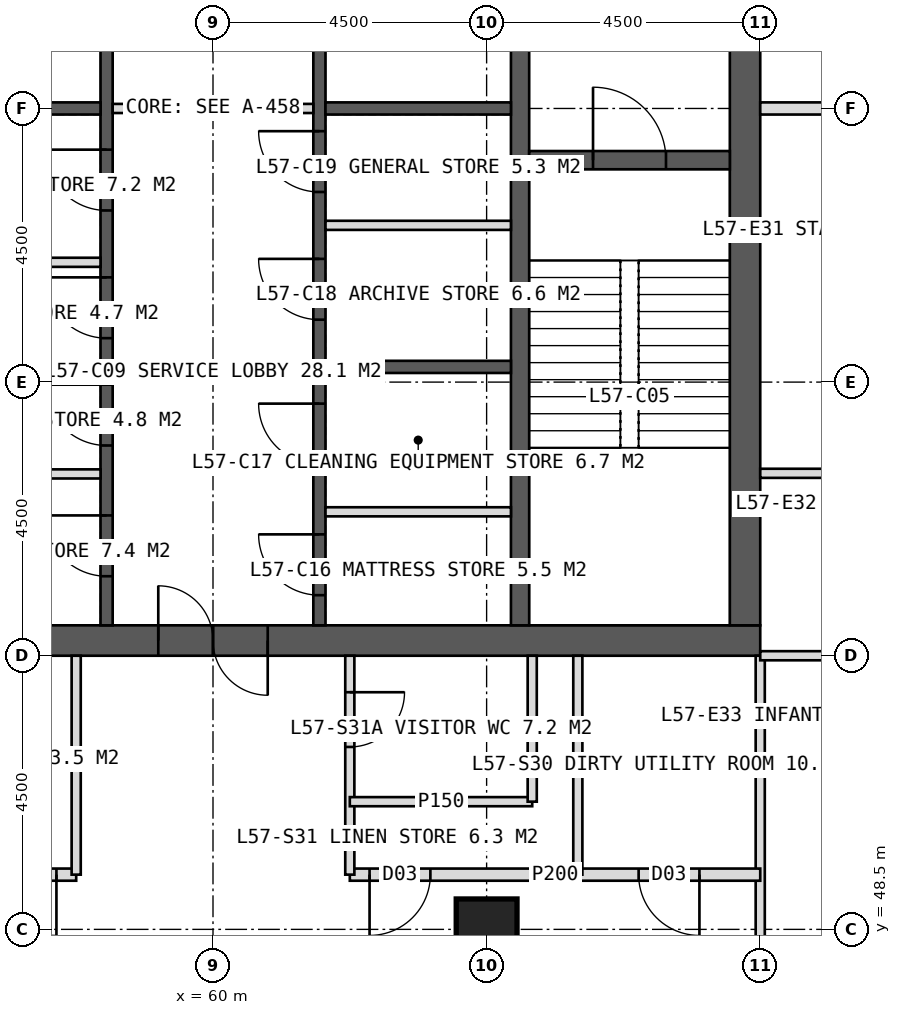
"""IFC4 building model, lengths in metres.
Left out: names, types, materials, properties, quantities, classifications, styles, units other than length and angle.
Written with IfcOpenShell. Run it as: python <this file> out.ifc"""

import sys

from ifc_helpers import new_model, si_unit, direction, frame, frame_2d, origin, origin_2d, place, context, subcontext, project, spatial, rectangle, hollow_rectangle, extrude, element, fill, save


model = new_model("IFC4")
c1 = context("Model", 3, precision=1e-05, world=origin(), true_north=direction((0.0, 1.0)))
c2 = subcontext(c1, "Body", "Model", "MODEL_VIEW")
j1 = project(units=[si_unit("LENGTHUNIT", "METRE"), si_unit("PLANEANGLEUNIT", "RADIAN")], contexts=[c1])
p1 = place(None, origin())
s1 = spatial("IfcSite", under=j1, at=p1, CompositionType="ELEMENT")
p2 = place(p1, origin())
s2 = spatial("IfcBuilding", under=s1, at=p2, CompositionType="ELEMENT")
p3 = place(p2, frame((0.0, 0.0, 237.0)))
s3 = spatial("IfcBuildingStorey", under=s2, at=p3, CompositionType="ELEMENT", Elevation=237.0)
p4 = place(p3, frame((51.0, 53.25, 0.0), z_axis=(0.0, 0.0, 1.0), x_axis=(1.0, 0.0, 0.0)))
e1 = element("IfcWall", 1, at=p4, inside=s3, PredefinedType="SHEAR", context=c2, shape_type="SweptSolid", body=[
    extrude(rectangle(XDim=18.0, YDim=0.5, at=frame_2d((9.0, 0.0))), origin(), (0.0, 0.0, 1.0), 4.0),
])
p5 = place(p4, frame((8.1, 0.0, 0.0)))
e2 = element("IfcOpeningElement", 2, at=p5, cuts=e1, PredefinedType="OPENING", context=c2, shape_type="SweptSolid", body=[
    extrude(rectangle(XDim=1.8, YDim=2.2, at=frame_2d((0.9, 1.1))), frame((0.0, 0.26, 0.0), z_axis=(0.0, -1.0, 0.0), x_axis=(1.0, 0.0, 0.0)), (0.0, 0.0, 1.0), 0.52),
])
p6 = place(p3, frame((68.75, 53.5, 0.0), z_axis=(0.0, 0.0, 1.0), x_axis=(0.0, 1.0, 0.0)))
e3 = element("IfcWall", 3, at=p6, inside=s3, PredefinedType="SHEAR", context=c2, shape_type="SweptSolid", body=[
    extrude(rectangle(XDim=17.0, YDim=0.5, at=frame_2d((8.5, 0.0))), origin(), (0.0, 0.0, 1.0), 4.0),
])
p7 = place(p6, frame((9.6, 0.0, 0.0)))
e4 = element("IfcOpeningElement", 4, at=p7, cuts=e3, PredefinedType="OPENING", context=c2, shape_type="SweptSolid", body=[
    extrude(rectangle(XDim=1.5, YDim=2.2, at=frame_2d((0.75, 1.1))), frame((0.0, 0.26, 0.0), z_axis=(0.0, -1.0, 0.0), x_axis=(1.0, 0.0, 0.0)), (0.0, 0.0, 1.0), 0.52),
])
p8 = place(p3, frame((65.05, 53.5, 0.0), z_axis=(0.0, 0.0, 1.0), x_axis=(0.0, 1.0, 0.0)))
e5 = element("IfcWall", 5, at=p8, inside=s3, PredefinedType="SHEAR", context=c2, shape_type="SweptSolid", body=[
    extrude(rectangle(XDim=17.0, YDim=0.3, at=frame_2d((8.5, 0.0))), origin(), (0.0, 0.0, 1.0), 4.0),
])
p9 = place(p3, frame((58.25, 53.5, 0.0), z_axis=(0.0, 0.0, 1.0), x_axis=(0.0, 1.0, 0.0)))
e6 = element("IfcWall", 6, at=p9, inside=s3, PredefinedType="SHEAR", context=c2, shape_type="SweptSolid", body=[
    extrude(rectangle(XDim=17.0, YDim=0.2, at=frame_2d((8.5, 0.0))), origin(), (0.0, 0.0, 1.0), 4.0),
])
p10 = place(p9, frame((0.808, 0.0, 0.0)))
e7 = element("IfcOpeningElement", 7, at=p10, cuts=e6, PredefinedType="OPENING", context=c2, shape_type="SweptSolid", body=[
    extrude(rectangle(XDim=1.0, YDim=2.1, at=frame_2d((0.5, 1.05))), frame((0.0, 0.11, 0.0), z_axis=(0.0, -1.0, 0.0), x_axis=(1.0, 0.0, 0.0)), (0.0, 0.0, 1.0), 0.22),
])
p11 = place(p9, frame((2.958, 0.0, 0.0)))
e8 = element("IfcOpeningElement", 8, at=p11, cuts=e6, PredefinedType="OPENING", context=c2, shape_type="SweptSolid", body=[
    extrude(rectangle(XDim=1.0, YDim=2.1, at=frame_2d((0.5, 1.05))), frame((0.0, 0.11, 0.0), z_axis=(0.0, -1.0, 0.0), x_axis=(1.0, 0.0, 0.0)), (0.0, 0.0, 1.0), 0.22),
])
p12 = place(p9, frame((4.722, 0.0, 0.0)))
e9 = element("IfcOpeningElement", 9, at=p12, cuts=e6, PredefinedType="OPENING", context=c2, shape_type="SweptSolid", body=[
    extrude(rectangle(XDim=1.0, YDim=2.1, at=frame_2d((0.5, 1.05))), frame((0.0, 0.11, 0.0), z_axis=(0.0, -1.0, 0.0), x_axis=(1.0, 0.0, 0.0)), (0.0, 0.0, 1.0), 0.22),
])
p13 = place(p9, frame((6.823, 0.0, 0.0)))
e10 = element("IfcOpeningElement", 10, at=p13, cuts=e6, PredefinedType="OPENING", context=c2, shape_type="SweptSolid", body=[
    extrude(rectangle(XDim=1.0, YDim=2.1, at=frame_2d((0.5, 1.05))), frame((0.0, 0.11, 0.0), z_axis=(0.0, -1.0, 0.0), x_axis=(1.0, 0.0, 0.0)), (0.0, 0.0, 1.0), 0.22),
])
p14 = place(p9, frame((10.025, 0.0, 0.0)))
e11 = element("IfcOpeningElement", 11, at=p14, cuts=e6, PredefinedType="OPENING", context=c2, shape_type="SweptSolid", body=[
    extrude(rectangle(XDim=1.4, YDim=2.2, at=frame_2d((0.7, 1.1))), frame((0.0, 0.11, 0.0), z_axis=(0.0, -1.0, 0.0), x_axis=(1.0, 0.0, 0.0)), (0.0, 0.0, 1.0), 0.22),
])
p15 = place(p9, frame((14.325, 0.0, 0.0)))
e12 = element("IfcOpeningElement", 12, at=p15, cuts=e6, PredefinedType="OPENING", context=c2, shape_type="SweptSolid", body=[
    extrude(rectangle(XDim=1.4, YDim=2.2, at=frame_2d((0.7, 1.1))), frame((0.0, 0.11, 0.0), z_axis=(0.0, -1.0, 0.0), x_axis=(1.0, 0.0, 0.0)), (0.0, 0.0, 1.0), 0.22),
])
p16 = place(p3, frame((61.75, 53.5, 0.0), z_axis=(0.0, 0.0, 1.0), x_axis=(0.0, 1.0, 0.0)))
e13 = element("IfcWall", 13, at=p16, inside=s3, PredefinedType="SHEAR", context=c2, shape_type="SweptSolid", body=[
    extrude(rectangle(XDim=17.0, YDim=0.2, at=frame_2d((8.5, 0.0))), origin(), (0.0, 0.0, 1.0), 4.0),
])
p17 = place(p16, frame((0.496, 0.0, 0.0)))
e14 = element("IfcOpeningElement", 14, at=p17, cuts=e13, PredefinedType="OPENING", context=c2, shape_type="SweptSolid", body=[
    extrude(rectangle(XDim=1.0, YDim=2.1, at=frame_2d((0.5, 1.05))), frame((0.0, 0.11, 0.0), z_axis=(0.0, -1.0, 0.0), x_axis=(1.0, 0.0, 0.0)), (0.0, 0.0, 1.0), 0.22),
])
p18 = place(p16, frame((2.646, 0.0, 0.0)))
e15 = element("IfcOpeningElement", 15, at=p18, cuts=e13, PredefinedType="OPENING", context=c2, shape_type="SweptSolid", body=[
    extrude(rectangle(XDim=1.0, YDim=2.1, at=frame_2d((0.5, 1.05))), frame((0.0, 0.11, 0.0), z_axis=(0.0, -1.0, 0.0), x_axis=(1.0, 0.0, 0.0)), (0.0, 0.0, 1.0), 0.22),
])
p19 = place(p16, frame((5.027, 0.0, 0.0)))
e16 = element("IfcOpeningElement", 16, at=p19, cuts=e13, PredefinedType="OPENING", context=c2, shape_type="SweptSolid", body=[
    extrude(rectangle(XDim=1.0, YDim=2.1, at=frame_2d((0.5, 1.05))), frame((0.0, 0.11, 0.0), z_axis=(0.0, -1.0, 0.0), x_axis=(1.0, 0.0, 0.0)), (0.0, 0.0, 1.0), 0.22),
])
p20 = place(p16, frame((7.126, 0.0, 0.0)))
e17 = element("IfcOpeningElement", 17, at=p20, cuts=e13, PredefinedType="OPENING", context=c2, shape_type="SweptSolid", body=[
    extrude(rectangle(XDim=1.0, YDim=2.1, at=frame_2d((0.5, 1.05))), frame((0.0, 0.11, 0.0), z_axis=(0.0, -1.0, 0.0), x_axis=(1.0, 0.0, 0.0)), (0.0, 0.0, 1.0), 0.22),
])
p21 = place(p16, frame((10.025, 0.0, 0.0)))
e18 = element("IfcOpeningElement", 18, at=p21, cuts=e13, PredefinedType="OPENING", context=c2, shape_type="SweptSolid", body=[
    extrude(rectangle(XDim=1.4, YDim=2.2, at=frame_2d((0.7, 1.1))), frame((0.0, 0.11, 0.0), z_axis=(0.0, -1.0, 0.0), x_axis=(1.0, 0.0, 0.0)), (0.0, 0.0, 1.0), 0.22),
])
p22 = place(p16, frame((14.325, 0.0, 0.0)))
e19 = element("IfcOpeningElement", 19, at=p22, cuts=e13, PredefinedType="OPENING", context=c2, shape_type="SweptSolid", body=[
    extrude(rectangle(XDim=1.4, YDim=2.2, at=frame_2d((0.7, 1.1))), frame((0.0, 0.11, 0.0), z_axis=(0.0, -1.0, 0.0), x_axis=(1.0, 0.0, 0.0)), (0.0, 0.0, 1.0), 0.22),
])
for number, where, z_axis, x_axis in (
    (20, (55.1, 57.75, 0.0), (0.0, 0.0, 1.0), (1.0, 0.0, 0.0)),
    (21, (61.85, 57.75, 0.0), (0.0, 0.0, 1.0), (1.0, 0.0, 0.0)),
    (22, (55.1, 62.0, 0.0), (0.0, 0.0, 1.0), (1.0, 0.0, 0.0)),
    (23, (61.85, 62.0, 0.0), (0.0, 0.0, 1.0), (1.0, 0.0, 0.0)),
):
    element("IfcWall", number, at=place(p3, frame(where, z_axis=z_axis, x_axis=x_axis)), inside=s3, PredefinedType="SHEAR", context=c2, shape_type="SweptSolid", body=[
        extrude(rectangle(XDim=3.05, YDim=0.2, at=frame_2d((1.525, 0.0))), origin(), (0.0, 0.0, 1.0), 4.0),
    ])
p23 = place(p3, frame((65.2, 61.15, 0.0), z_axis=(0.0, 0.0, 1.0), x_axis=(1.0, 0.0, 0.0)))
e24 = element("IfcWall", 24, at=p23, inside=s3, PredefinedType="SHEAR", context=c2, shape_type="SweptSolid", body=[
    extrude(rectangle(XDim=3.3, YDim=0.3, at=frame_2d((1.65, 0.0))), origin(), (0.0, 0.0, 1.0), 4.0),
])
p24 = place(p23, frame((1.05, 0.0, 0.0)))
e25 = element("IfcOpeningElement", 25, at=p24, cuts=e24, PredefinedType="OPENING", context=c2, shape_type="SweptSolid", body=[
    extrude(rectangle(XDim=1.2, YDim=2.1, at=frame_2d((0.6, 1.05))), frame((0.0, 0.16, 0.0), z_axis=(0.0, -1.0, 0.0), x_axis=(1.0, 0.0, 0.0)), (0.0, 0.0, 1.0), 0.32),
])
p25 = place(p3, frame((64.5, 48.5, 0.0), z_axis=(0.0, 0.0, 1.0), x_axis=(1.0, 0.0, 0.0)))
e26 = element("IfcColumn", 26, at=p25, inside=s3, PredefinedType="COLUMN", context=c2, shape_type="SweptSolid", body=[
    extrude(hollow_rectangle(XDim=1.0, YDim=1.0, WallThickness=0.1, at=origin_2d()), origin(), (0.0, 0.0, 1.0), 4.0),
])
p26 = place(p3, frame((69.0, 53.0, 0.0), z_axis=(0.0, 0.0, 1.0), x_axis=(0.0, -1.0, 0.0)))
e27 = element("IfcWall", 27, at=p26, inside=s3, PredefinedType="PARTITIONING", context=c2, shape_type="SweptSolid", body=[
    extrude(rectangle(XDim=5.1, YDim=0.15, at=frame_2d((2.55, 0.0))), origin(), (0.0, 0.0, 1.0), 3.75),
])
p27 = place(p3, frame((69.0, 49.4, 0.0), z_axis=(0.0, 0.0, 1.0), x_axis=(-1.0, 0.0, 0.0)))
e28 = element("IfcWall", 28, at=p27, inside=s3, PredefinedType="PARTITIONING", context=c2, shape_type="SweptSolid", body=[
    extrude(rectangle(XDim=6.75, YDim=0.2, at=frame_2d((3.375, 0.0))), origin(), (0.0, 0.0, 1.0), 3.75),
])
p28 = place(p27, frame((1.0, 0.0, 0.0)))
e29 = element("IfcOpeningElement", 29, at=p28, cuts=e28, PredefinedType="OPENING", context=c2, shape_type="SweptSolid", body=[
    extrude(rectangle(XDim=1.0, YDim=2.1, at=frame_2d((0.5, 1.05))), frame((0.0, 0.11, 0.0), z_axis=(0.0, -1.0, 0.0), x_axis=(1.0, 0.0, 0.0)), (0.0, 0.0, 1.0), 0.22),
])
p29 = place(p27, frame((5.425, 0.0, 0.0)))
e30 = element("IfcOpeningElement", 30, at=p29, cuts=e28, PredefinedType="OPENING", context=c2, shape_type="SweptSolid", body=[
    extrude(rectangle(XDim=1.0, YDim=2.1, at=frame_2d((0.5, 1.05))), frame((0.0, 0.11, 0.0), z_axis=(0.0, -1.0, 0.0), x_axis=(1.0, 0.0, 0.0)), (0.0, 0.0, 1.0), 0.22),
])
p30 = place(p3, frame((57.75, 49.4, 0.0), z_axis=(0.0, 0.0, 1.0), x_axis=(-1.0, 0.0, 0.0)))
e31 = element("IfcWall", 31, at=p30, inside=s3, PredefinedType="PARTITIONING", context=c2, shape_type="SweptSolid", body=[
    extrude(rectangle(XDim=11.85, YDim=0.2, at=frame_2d((5.925, 0.0))), origin(), (0.0, 0.0, 1.0), 3.75),
])
p31 = place(p30, frame((0.325, 0.0, 0.0)))
e32 = element("IfcOpeningElement", 32, at=p31, cuts=e31, PredefinedType="OPENING", context=c2, shape_type="SweptSolid", body=[
    extrude(rectangle(XDim=1.0, YDim=2.1, at=frame_2d((0.5, 1.05))), frame((0.0, 0.11, 0.0), z_axis=(0.0, -1.0, 0.0), x_axis=(1.0, 0.0, 0.0)), (0.0, 0.0, 1.0), 0.22),
])
p32 = place(p30, frame((4.75, 0.0, 0.0)))
e33 = element("IfcOpeningElement", 33, at=p32, cuts=e31, PredefinedType="OPENING", context=c2, shape_type="SweptSolid", body=[
    extrude(rectangle(XDim=1.0, YDim=2.1, at=frame_2d((0.5, 1.05))), frame((0.0, 0.11, 0.0), z_axis=(0.0, -1.0, 0.0), x_axis=(1.0, 0.0, 0.0)), (0.0, 0.0, 1.0), 0.22),
])
p33 = place(p30, frame((8.8, 0.0, 0.0)))
e34 = element("IfcOpeningElement", 34, at=p33, cuts=e31, PredefinedType="OPENING", context=c2, shape_type="SweptSolid", body=[
    extrude(rectangle(XDim=1.0, YDim=2.1, at=frame_2d((0.5, 1.05))), frame((0.0, 0.11, 0.0), z_axis=(0.0, -1.0, 0.0), x_axis=(1.0, 0.0, 0.0)), (0.0, 0.0, 1.0), 0.22),
])
p34 = place(p3, frame((62.25, 53.0, 0.0), z_axis=(0.0, 0.0, 1.0), x_axis=(0.0, -1.0, 0.0)))
e35 = element("IfcWall", 35, at=p34, inside=s3, PredefinedType="PARTITIONING", context=c2, shape_type="SweptSolid", body=[
    extrude(rectangle(XDim=3.6, YDim=0.15, at=frame_2d((1.8, 0.0))), origin(), (0.0, 0.0, 1.0), 3.75),
])
p35 = place(p34, frame((0.6, 0.0, 0.0)))
e36 = element("IfcOpeningElement", 36, at=p35, cuts=e35, PredefinedType="OPENING", context=c2, shape_type="SweptSolid", body=[
    extrude(rectangle(XDim=0.9, YDim=2.1, at=frame_2d((0.45, 1.05))), frame((0.0, 0.085, 0.0), z_axis=(0.0, -1.0, 0.0), x_axis=(1.0, 0.0, 0.0)), (0.0, 0.0, 1.0), 0.17),
])
for number, where, z_axis, x_axis in (
    (37, (57.75, 53.0, 0.0), (0.0, 0.0, 1.0), (0.0, -1.0, 0.0)),
    (38, (66.0, 53.0, 0.0), (0.0, 0.0, 1.0), (0.0, -1.0, 0.0)),
):
    element("IfcWall", number, at=place(p3, frame(where, z_axis=z_axis, x_axis=x_axis)), inside=s3, PredefinedType="PARTITIONING", context=c2, shape_type="SweptSolid", body=[
        extrude(rectangle(XDim=3.6, YDim=0.15, at=frame_2d((1.8, 0.0))), origin(), (0.0, 0.0, 1.0), 3.75),
    ])
p36 = place(p3, frame((65.25, 50.6, 0.0), z_axis=(0.0, 0.0, 1.0), x_axis=(-1.0, 0.0, 0.0)))
e39 = element("IfcWall", 39, at=p36, inside=s3, PredefinedType="PARTITIONING", context=c2, shape_type="SweptSolid", body=[
    extrude(rectangle(XDim=3.0, YDim=0.15, at=frame_2d((1.5, 0.0))), origin(), (0.0, 0.0, 1.0), 3.75),
])
p37 = place(p3, frame((65.25, 53.0, 0.0), z_axis=(0.0, 0.0, 1.0), x_axis=(0.0, -1.0, 0.0)))
e40 = element("IfcWall", 40, at=p37, inside=s3, PredefinedType="PARTITIONING", context=c2, shape_type="SweptSolid", body=[
    extrude(rectangle(XDim=2.4, YDim=0.15, at=frame_2d((1.2, 0.0))), origin(), (0.0, 0.0, 1.0), 3.75),
])
p38 = place(p3, frame((69.0, 62.0, 0.0), z_axis=(0.0, 0.0, 1.0), x_axis=(1.0, 0.0, 0.0)))
e41 = element("IfcWall", 41, at=p38, inside=s3, PredefinedType="SOLIDWALL", context=c2, shape_type="SweptSolid", body=[
    extrude(rectangle(XDim=5.1, YDim=0.2, at=frame_2d((2.55, 0.0))), origin(), (0.0, 0.0, 1.0), 2.95),
])
for number, where, z_axis, x_axis in (
    (42, (69.0, 56.0, 0.0), (0.0, 0.0, 1.0), (1.0, 0.0, 0.0)),
    (43, (69.0, 53.0, 0.0), (0.0, 0.0, 1.0), (1.0, 0.0, 0.0)),
):
    element("IfcWall", number, at=place(p3, frame(where, z_axis=z_axis, x_axis=x_axis)), inside=s3, PredefinedType="PARTITIONING", context=c2, shape_type="SweptSolid", body=[
        extrude(rectangle(XDim=5.1, YDim=0.15, at=frame_2d((2.55, 0.0))), origin(), (0.0, 0.0, 1.0), 3.75),
    ])
for number, where, z_axis, x_axis in (
    (44, (55.1, 55.99, 0.0), (0.0, 0.0, 1.0), (1.0, 0.0, 0.0)),
    (45, (61.85, 55.367, 0.0), (0.0, 0.0, 1.0), (1.0, 0.0, 0.0)),
    (46, (55.1, 59.47, 0.0), (0.0, 0.0, 1.0), (1.0, 0.0, 0.0)),
    (47, (61.85, 60.078, 0.0), (0.0, 0.0, 1.0), (1.0, 0.0, 0.0)),
):
    element("IfcWall", number, at=place(p3, frame(where, z_axis=z_axis, x_axis=x_axis)), inside=s3, PredefinedType="PARTITIONING", context=c2, shape_type="SweptSolid", body=[
        extrude(rectangle(XDim=3.05, YDim=0.15, at=frame_2d((1.525, 0.0))), origin(), (0.0, 0.0, 1.0), 3.75),
    ])
p39 = place(p3, frame((58.35, 62.0, 0.0), z_axis=(0.0, 0.0, 1.0), x_axis=(1.0, 0.0, 0.0)))
e48 = element("IfcWall", 48, at=p39, inside=s3, PredefinedType="PARTITIONING", context=c2, shape_type="SweptSolid", body=[
    extrude(rectangle(XDim=3.3, YDim=0.15, at=frame_2d((1.65, 0.0))), origin(), (0.0, 0.0, 1.0), 3.75),
])
p40 = place(p28, origin())
e49 = element("IfcDoor", 49, at=p40, inside=s3, OperationType="SINGLE_SWING_LEFT", PredefinedType="DOOR", context=c2, shape_type="SweptSolid", body=[
    extrude(rectangle(XDim=1.0, YDim=2.1, at=frame_2d((0.5, 1.05))), frame((0.0, 0.025, 0.0), z_axis=(0.0, -1.0, 0.0), x_axis=(1.0, 0.0, 0.0)), (0.0, 0.0, 1.0), 0.05),
])
fill(e29, e49)
p41 = place(p35, origin())
e50 = element("IfcDoor", 50, at=p41, inside=s3, OperationType="SINGLE_SWING_LEFT", PredefinedType="DOOR", context=c2, shape_type="SweptSolid", body=[
    extrude(rectangle(XDim=0.9, YDim=2.1, at=frame_2d((0.45, 1.05))), frame((0.0, 0.025, 0.0), z_axis=(0.0, -1.0, 0.0), x_axis=(1.0, 0.0, 0.0)), (0.0, 0.0, 1.0), 0.05),
])
fill(e36, e50)
p42 = place(p29, origin())
e51 = element("IfcDoor", 51, at=p42, inside=s3, OperationType="SINGLE_SWING_RIGHT", PredefinedType="DOOR", context=c2, shape_type="SweptSolid", body=[
    extrude(rectangle(XDim=1.0, YDim=2.1, at=frame_2d((0.5, 1.05))), frame((0.0, 0.025, 0.0), z_axis=(0.0, -1.0, 0.0), x_axis=(1.0, 0.0, 0.0)), (0.0, 0.0, 1.0), 0.05),
])
fill(e30, e51)
p43 = place(p31, origin())
e52 = element("IfcDoor", 52, at=p43, inside=s3, OperationType="SINGLE_SWING_LEFT", PredefinedType="DOOR", context=c2, shape_type="SweptSolid", body=[
    extrude(rectangle(XDim=1.0, YDim=2.1, at=frame_2d((0.5, 1.05))), frame((0.0, 0.025, 0.0), z_axis=(0.0, -1.0, 0.0), x_axis=(1.0, 0.0, 0.0)), (0.0, 0.0, 1.0), 0.05),
])
fill(e32, e52)
p44 = place(p24, origin())
e53 = element("IfcDoor", 53, at=p44, inside=s3, OperationType="SINGLE_SWING_LEFT", PredefinedType="DOOR", context=c2, shape_type="SweptSolid", body=[
    extrude(rectangle(XDim=1.2, YDim=2.1, at=frame_2d((0.6, 1.05))), frame((0.0, 0.025, 0.0), z_axis=(0.0, -1.0, 0.0), x_axis=(1.0, 0.0, 0.0)), (0.0, 0.0, 1.0), 0.05),
])
fill(e25, e53)
p45 = place(p10, origin())
e54 = element("IfcDoor", 54, at=p45, inside=s3, OperationType="SINGLE_SWING_RIGHT", PredefinedType="DOOR", context=c2, shape_type="SweptSolid", body=[
    extrude(rectangle(XDim=1.0, YDim=2.1, at=frame_2d((0.5, 1.05))), frame((0.0, 0.025, 0.0), z_axis=(0.0, -1.0, 0.0), x_axis=(1.0, 0.0, 0.0)), (0.0, 0.0, 1.0), 0.05),
])
fill(e7, e54)
p46 = place(p11, origin())
e55 = element("IfcDoor", 55, at=p46, inside=s3, OperationType="SINGLE_SWING_RIGHT", PredefinedType="DOOR", context=c2, shape_type="SweptSolid", body=[
    extrude(rectangle(XDim=1.0, YDim=2.1, at=frame_2d((0.5, 1.05))), frame((0.0, 0.025, 0.0), z_axis=(0.0, -1.0, 0.0), x_axis=(1.0, 0.0, 0.0)), (0.0, 0.0, 1.0), 0.05),
])
fill(e8, e55)
p47 = place(p17, origin())
e56 = element("IfcDoor", 56, at=p47, inside=s3, OperationType="SINGLE_SWING_RIGHT", PredefinedType="DOOR", context=c2, shape_type="SweptSolid", body=[
    extrude(rectangle(XDim=1.0, YDim=2.1, at=frame_2d((0.5, 1.05))), frame((0.0, 0.025, 0.0), z_axis=(0.0, -1.0, 0.0), x_axis=(1.0, 0.0, 0.0)), (0.0, 0.0, 1.0), 0.05),
])
fill(e14, e56)
p48 = place(p18, origin())
e57 = element("IfcDoor", 57, at=p48, inside=s3, OperationType="SINGLE_SWING_RIGHT", PredefinedType="DOOR", context=c2, shape_type="SweptSolid", body=[
    extrude(rectangle(XDim=1.0, YDim=2.1, at=frame_2d((0.5, 1.05))), frame((0.0, 0.025, 0.0), z_axis=(0.0, -1.0, 0.0), x_axis=(1.0, 0.0, 0.0)), (0.0, 0.0, 1.0), 0.05),
])
fill(e15, e57)
p49 = place(p12, origin())
e58 = element("IfcDoor", 58, at=p49, inside=s3, OperationType="SINGLE_SWING_RIGHT", PredefinedType="DOOR", context=c2, shape_type="SweptSolid", body=[
    extrude(rectangle(XDim=1.0, YDim=2.1, at=frame_2d((0.5, 1.05))), frame((0.0, 0.025, 0.0), z_axis=(0.0, -1.0, 0.0), x_axis=(1.0, 0.0, 0.0)), (0.0, 0.0, 1.0), 0.05),
])
fill(e9, e58)
p50 = place(p13, origin())
e59 = element("IfcDoor", 59, at=p50, inside=s3, OperationType="SINGLE_SWING_RIGHT", PredefinedType="DOOR", context=c2, shape_type="SweptSolid", body=[
    extrude(rectangle(XDim=1.0, YDim=2.1, at=frame_2d((0.5, 1.05))), frame((0.0, 0.025, 0.0), z_axis=(0.0, -1.0, 0.0), x_axis=(1.0, 0.0, 0.0)), (0.0, 0.0, 1.0), 0.05),
])
fill(e10, e59)
p51 = place(p19, origin())
e60 = element("IfcDoor", 60, at=p51, inside=s3, OperationType="SINGLE_SWING_RIGHT", PredefinedType="DOOR", context=c2, shape_type="SweptSolid", body=[
    extrude(rectangle(XDim=1.0, YDim=2.1, at=frame_2d((0.5, 1.05))), frame((0.0, 0.025, 0.0), z_axis=(0.0, -1.0, 0.0), x_axis=(1.0, 0.0, 0.0)), (0.0, 0.0, 1.0), 0.05),
])
fill(e16, e60)
p52 = place(p20, origin())
e61 = element("IfcDoor", 61, at=p52, inside=s3, OperationType="SINGLE_SWING_RIGHT", PredefinedType="DOOR", context=c2, shape_type="SweptSolid", body=[
    extrude(rectangle(XDim=1.0, YDim=2.1, at=frame_2d((0.5, 1.05))), frame((0.0, 0.025, 0.0), z_axis=(0.0, -1.0, 0.0), x_axis=(1.0, 0.0, 0.0)), (0.0, 0.0, 1.0), 0.05),
])
fill(e17, e61)
p53 = place(p5, origin())
e62 = element("IfcDoor", 62, at=p53, inside=s3, OperationType="DOUBLE_DOOR_SINGLE_SWING", PredefinedType="DOOR", context=c2, shape_type="SweptSolid", body=[
    extrude(rectangle(XDim=1.8, YDim=2.2, at=frame_2d((0.9, 1.1))), frame((0.0, 0.025, 0.0), z_axis=(0.0, -1.0, 0.0), x_axis=(1.0, 0.0, 0.0)), (0.0, 0.0, 1.0), 0.05),
])
fill(e2, e62)
save(model, sys.argv[1])
